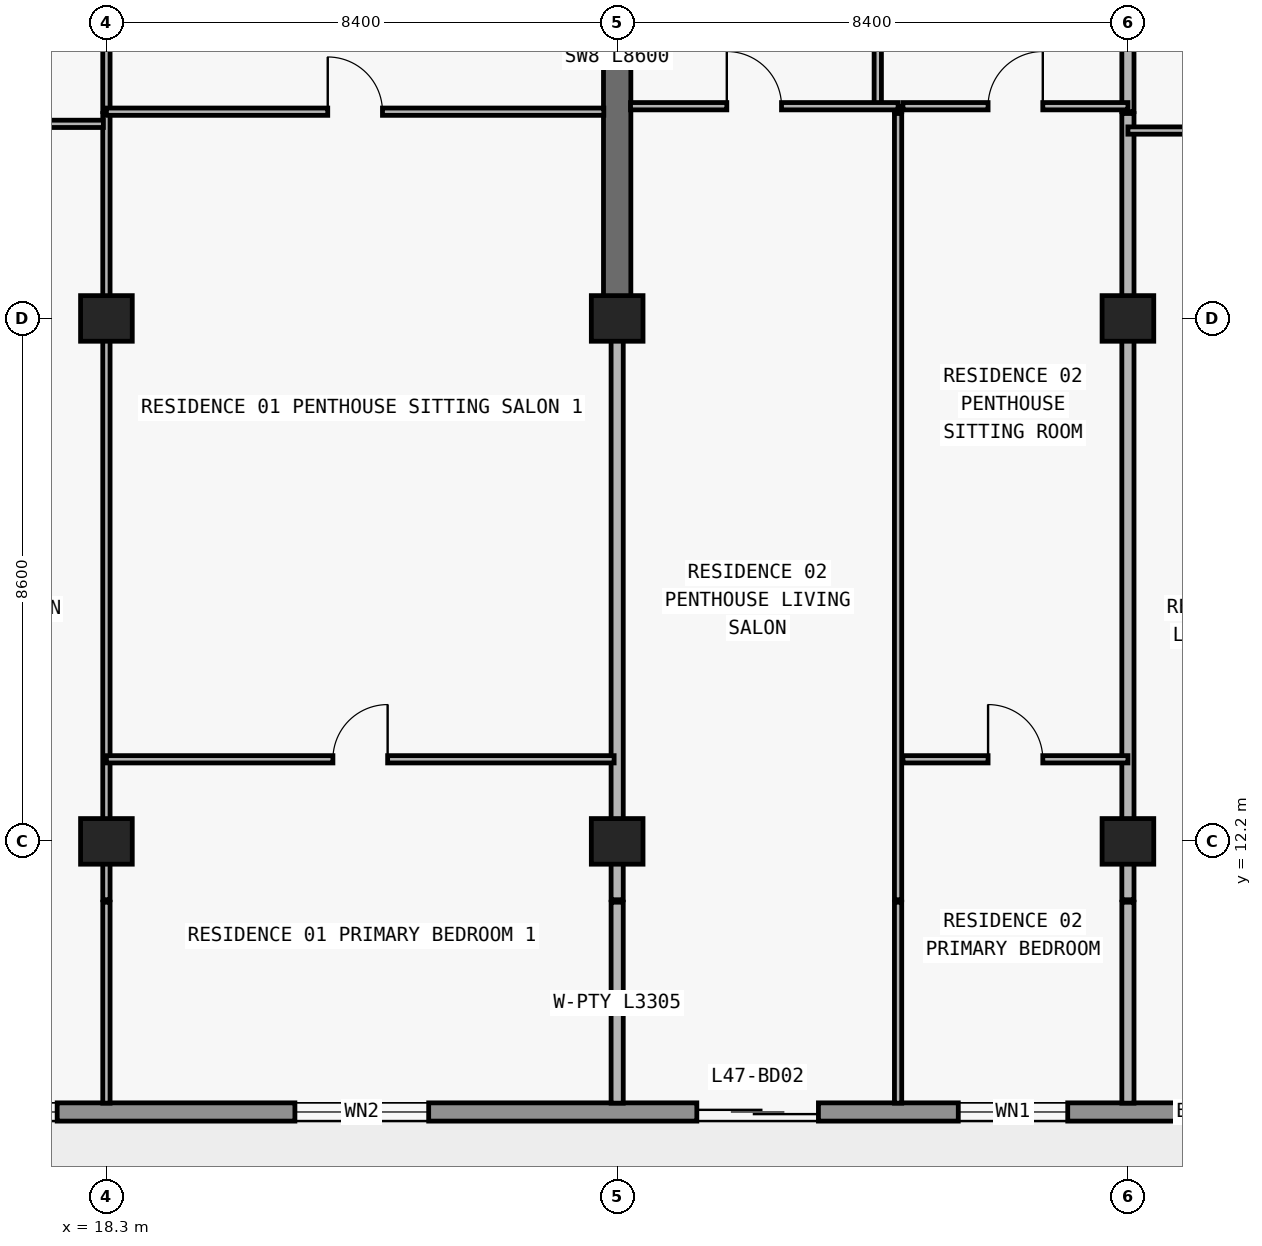
"""IFC4 building model, lengths in metres.
Left out: names, types, materials, properties, quantities, classifications, styles, units other than length and angle.
Written with IfcOpenShell. Run it as: python <this file> out.ifc"""

import sys

from ifc_helpers import new_model, si_unit, direction, frame, frame_2d, origin, origin_2d, place, context, subcontext, project, spatial, rectangle, extrude, element, fill, save


model = new_model("IFC4")
c1 = context("Model", 3, precision=1e-05, world=origin(), true_north=direction((0.0, 1.0)))
c2 = subcontext(c1, "Body", "Model", "MODEL_VIEW")
j1 = project(units=[si_unit("LENGTHUNIT", "METRE"), si_unit("PLANEANGLEUNIT", "RADIAN")], contexts=[c1])
p1 = place(None, origin())
s1 = spatial("IfcSite", under=j1, at=p1, CompositionType="ELEMENT")
p2 = place(p1, origin())
s2 = spatial("IfcBuilding", under=s1, at=p2, CompositionType="ELEMENT")
p3 = place(p2, frame((0.0, 0.0, 170.4)))
s3 = spatial("IfcBuildingStorey", under=s2, at=p3, CompositionType="ELEMENT", Elevation=170.4)
for number, where, z_axis, x_axis in (
    (1, (18.3, 12.2, 0.0), (0.0, 0.0, 1.0), (1.0, 0.0, 0.0)),
    (2, (26.7, 12.2, 0.0), (0.0, 0.0, 1.0), (1.0, 0.0, 0.0)),
    (3, (35.1, 12.2, 0.0), (0.0, 0.0, 1.0), (1.0, 0.0, 0.0)),
    (4, (18.3, 20.8, 0.0), (0.0, 0.0, 1.0), (1.0, 0.0, 0.0)),
    (5, (26.7, 20.8, 0.0), (0.0, 0.0, 1.0), (1.0, 0.0, 0.0)),
    (6, (35.1, 20.8, 0.0), (0.0, 0.0, 1.0), (1.0, 0.0, 0.0)),
):
    element("IfcColumn", number, at=place(p3, frame(where, z_axis=z_axis, x_axis=x_axis)), inside=s3, PredefinedType="COLUMN", context=c2, shape_type="SweptSolid", body=[
        extrude(rectangle(XDim=0.85, YDim=0.75, at=origin_2d()), origin(), (0.0, 0.0, 1.0), 3.05),
    ])
p4 = place(p3, frame((26.7, 20.8, 0.0), z_axis=(0.0, 0.0, 1.0), x_axis=(0.0, 1.0, 0.0)))
e7 = element("IfcWall", 7, at=p4, inside=s3, PredefinedType="SHEAR", context=c2, shape_type="SweptSolid", body=[
    extrude(rectangle(XDim=8.6, YDim=0.45, at=frame_2d((4.3, 0.0))), origin(), (0.0, 0.0, 1.0), 3.05),
])
p5 = place(p3, frame((67.7, 7.75, 0.0), z_axis=(0.0, 0.0, 1.0), x_axis=(-1.0, 0.0, 0.0)))
e8 = element("IfcWall", 8, at=p5, inside=s3, PredefinedType="STANDARD", context=c2, shape_type="SweptSolid", body=[
    extrude(rectangle(XDim=57.6, YDim=0.3, at=frame_2d((28.8, 0.0))), origin(), (0.0, 0.0, 1.0), 3.05),
])
p6 = place(p5, frame((54.69, 0.0, 0.0)))
e9 = element("IfcOpeningElement", 9, at=p6, cuts=e8, PredefinedType="OPENING", context=c2, shape_type="SweptSolid", body=[
    extrude(rectangle(XDim=2.0, YDim=2.3, at=frame_2d((1.0, 1.15))), frame((0.0, 0.16, 0.0), z_axis=(0.0, -1.0, 0.0), x_axis=(1.0, 0.0, 0.0)), (0.0, 0.0, 1.0), 0.32),
])
p7 = place(p5, frame((50.21, 0.0, 0.65)))
e10 = element("IfcOpeningElement", 10, at=p7, cuts=e8, PredefinedType="OPENING", context=c2, shape_type="SweptSolid", body=[
    extrude(rectangle(XDim=2.6, YDim=1.85, at=frame_2d((1.3, 0.925))), frame((0.0, 0.16, 0.0), z_axis=(0.0, -1.0, 0.0), x_axis=(1.0, 0.0, 0.0)), (0.0, 0.0, 1.0), 0.32),
])
p8 = place(p5, frame((44.1, 0.0, 0.85)))
e11 = element("IfcOpeningElement", 11, at=p8, cuts=e8, PredefinedType="OPENING", context=c2, shape_type="SweptSolid", body=[
    extrude(rectangle(XDim=2.2, YDim=1.55, at=frame_2d((1.1, 0.775))), frame((0.0, 0.16, 0.0), z_axis=(0.0, -1.0, 0.0), x_axis=(1.0, 0.0, 0.0)), (0.0, 0.0, 1.0), 0.32),
])
p9 = place(p5, frame((37.69, 0.0, 0.0)))
e12 = element("IfcOpeningElement", 12, at=p9, cuts=e8, PredefinedType="OPENING", context=c2, shape_type="SweptSolid", body=[
    extrude(rectangle(XDim=2.0, YDim=2.3, at=frame_2d((1.0, 1.15))), frame((0.0, 0.16, 0.0), z_axis=(0.0, -1.0, 0.0), x_axis=(1.0, 0.0, 0.0)), (0.0, 0.0, 1.0), 0.32),
])
p10 = place(p5, frame((33.59, 0.0, 0.85)))
e13 = element("IfcOpeningElement", 13, at=p10, cuts=e8, PredefinedType="OPENING", context=c2, shape_type="SweptSolid", body=[
    extrude(rectangle(XDim=1.8, YDim=1.55, at=frame_2d((0.9, 0.775))), frame((0.0, 0.16, 0.0), z_axis=(0.0, -1.0, 0.0), x_axis=(1.0, 0.0, 0.0)), (0.0, 0.0, 1.0), 0.32),
])
p11 = place(p5, frame((25.914, 0.0, 0.85)))
e14 = element("IfcOpeningElement", 14, at=p11, cuts=e8, PredefinedType="OPENING", context=c2, shape_type="SweptSolid", body=[
    extrude(rectangle(XDim=2.2, YDim=1.55, at=frame_2d((1.1, 0.775))), frame((0.0, 0.16, 0.0), z_axis=(0.0, -1.0, 0.0), x_axis=(1.0, 0.0, 0.0)), (0.0, 0.0, 1.0), 0.32),
])
p12 = place(p5, frame((21.69, 0.0, 0.0)))
e15 = element("IfcOpeningElement", 15, at=p12, cuts=e8, PredefinedType="OPENING", context=c2, shape_type="SweptSolid", body=[
    extrude(rectangle(XDim=2.0, YDim=2.3, at=frame_2d((1.0, 1.15))), frame((0.0, 0.16, 0.0), z_axis=(0.0, -1.0, 0.0), x_axis=(1.0, 0.0, 0.0)), (0.0, 0.0, 1.0), 0.32),
])
p13 = place(p5, frame((17.59, 0.0, 0.85)))
e16 = element("IfcOpeningElement", 16, at=p13, cuts=e8, PredefinedType="OPENING", context=c2, shape_type="SweptSolid", body=[
    extrude(rectangle(XDim=1.8, YDim=1.55, at=frame_2d((0.9, 0.775))), frame((0.0, 0.16, 0.0), z_axis=(0.0, -1.0, 0.0), x_axis=(1.0, 0.0, 0.0)), (0.0, 0.0, 1.0), 0.32),
])
p14 = place(p5, frame((13.69, 0.0, 0.0)))
e17 = element("IfcOpeningElement", 17, at=p14, cuts=e8, PredefinedType="OPENING", context=c2, shape_type="SweptSolid", body=[
    extrude(rectangle(XDim=2.0, YDim=2.3, at=frame_2d((1.0, 1.15))), frame((0.0, 0.16, 0.0), z_axis=(0.0, -1.0, 0.0), x_axis=(1.0, 0.0, 0.0)), (0.0, 0.0, 1.0), 0.32),
])
p15 = place(p5, frame((9.01, 0.0, 0.65)))
e18 = element("IfcOpeningElement", 18, at=p15, cuts=e8, PredefinedType="OPENING", context=c2, shape_type="SweptSolid", body=[
    extrude(rectangle(XDim=2.6, YDim=1.85, at=frame_2d((1.3, 0.925))), frame((0.0, 0.16, 0.0), z_axis=(0.0, -1.0, 0.0), x_axis=(1.0, 0.0, 0.0)), (0.0, 0.0, 1.0), 0.32),
])
p16 = place(p5, frame((3.0, 0.0, 0.85)))
e19 = element("IfcOpeningElement", 19, at=p16, cuts=e8, PredefinedType="OPENING", context=c2, shape_type="SweptSolid", body=[
    extrude(rectangle(XDim=2.2, YDim=1.55, at=frame_2d((1.1, 0.775))), frame((0.0, 0.16, 0.0), z_axis=(0.0, -1.0, 0.0), x_axis=(1.0, 0.0, 0.0)), (0.0, 0.0, 1.0), 0.32),
])
p17 = place(p3, frame((18.3, 7.895, 0.0), z_axis=(0.0, 0.0, 1.0), x_axis=(0.0, 1.0, 0.0)))
e20 = element("IfcWall", 20, at=p17, inside=s3, PredefinedType="PARTITIONING", context=c2, shape_type="SweptSolid", body=[
    extrude(rectangle(XDim=3.305, YDim=0.12, at=frame_2d((1.652, 0.0))), origin(), (0.0, 0.0, 1.0), 3.05),
])
p18 = place(p3, frame((18.3, 11.24, 0.0), z_axis=(0.0, 0.0, 1.0), x_axis=(0.0, 1.0, 0.0)))
e21 = element("IfcWall", 21, at=p18, inside=s3, PredefinedType="PARTITIONING", context=c2, shape_type="SweptSolid", body=[
    extrude(rectangle(XDim=12.93, YDim=0.12, at=frame_2d((6.465, 0.0))), origin(), (0.0, 0.0, 1.0), 2.263),
])
p19 = place(p3, frame((18.3, 24.2, 0.0), z_axis=(0.0, 0.0, 1.0), x_axis=(0.0, 1.0, 0.0)))
e22 = element("IfcWall", 22, at=p19, inside=s3, PredefinedType="PARTITIONING", context=c2, shape_type="SweptSolid", body=[
    extrude(rectangle(XDim=4.84, YDim=0.12, at=frame_2d((2.42, 0.0))), origin(), (0.0, 0.0, 1.0), 2.263),
])
p20 = place(p19, frame((1.75, 0.0, 0.0)))
e23 = element("IfcOpeningElement", 23, at=p20, cuts=e22, PredefinedType="OPENING", context=c2, shape_type="SweptSolid", body=[
    extrude(rectangle(XDim=0.9, YDim=2.15, at=frame_2d((0.45, 1.075))), frame((0.0, 0.07, 0.0), z_axis=(0.0, -1.0, 0.0), x_axis=(1.0, 0.0, 0.0)), (0.0, 0.0, 1.0), 0.14),
])
p21 = place(p3, frame((26.7, 7.895, 0.0), z_axis=(0.0, 0.0, 1.0), x_axis=(0.0, 1.0, 0.0)))
e24 = element("IfcWall", 24, at=p21, inside=s3, PredefinedType="PARTITIONING", context=c2, shape_type="SweptSolid", body=[
    extrude(rectangle(XDim=3.305, YDim=0.2, at=frame_2d((1.652, 0.0))), origin(), (0.0, 0.0, 1.0), 3.05),
])
p22 = place(p3, frame((26.7, 11.24, 0.0), z_axis=(0.0, 0.0, 1.0), x_axis=(0.0, 1.0, 0.0)))
e25 = element("IfcWall", 25, at=p22, inside=s3, PredefinedType="PARTITIONING", context=c2, shape_type="SweptSolid", body=[
    extrude(rectangle(XDim=9.555, YDim=0.2, at=frame_2d((4.777, 0.0))), origin(), (0.0, 0.0, 1.0), 2.263),
])
p23 = place(p3, frame((30.986, 24.29, 0.0), z_axis=(0.0, 0.0, 1.0), x_axis=(0.0, 1.0, 0.0)))
e26 = element("IfcWall", 26, at=p23, inside=s3, PredefinedType="PARTITIONING", context=c2, shape_type="SweptSolid", body=[
    extrude(rectangle(XDim=4.75, YDim=0.12, at=frame_2d((2.375, 0.0))), origin(), (0.0, 0.0, 1.0), 2.725),
])
p24 = place(p23, frame((1.925, 0.0, 0.0)))
e27 = element("IfcOpeningElement", 27, at=p24, cuts=e26, PredefinedType="OPENING", context=c2, shape_type="SweptSolid", body=[
    extrude(rectangle(XDim=0.9, YDim=2.15, at=frame_2d((0.45, 1.075))), frame((0.0, 0.07, 0.0), z_axis=(0.0, -1.0, 0.0), x_axis=(1.0, 0.0, 0.0)), (0.0, 0.0, 1.0), 0.14),
])
p25 = place(p3, frame((31.32, 7.895, 0.0), z_axis=(0.0, 0.0, 1.0), x_axis=(0.0, 1.0, 0.0)))
e28 = element("IfcWall", 28, at=p25, inside=s3, PredefinedType="PARTITIONING", context=c2, shape_type="SweptSolid", body=[
    extrude(rectangle(XDim=3.305, YDim=0.12, at=frame_2d((1.652, 0.0))), origin(), (0.0, 0.0, 1.0), 3.05),
])
p26 = place(p3, frame((31.32, 11.24, 0.0), z_axis=(0.0, 0.0, 1.0), x_axis=(0.0, 1.0, 0.0)))
e29 = element("IfcWall", 29, at=p26, inside=s3, PredefinedType="PARTITIONING", context=c2, shape_type="SweptSolid", body=[
    extrude(rectangle(XDim=12.93, YDim=0.12, at=frame_2d((6.465, 0.0))), origin(), (0.0, 0.0, 1.0), 3.05),
])
p27 = place(p3, frame((31.32, 24.2, 0.0), z_axis=(0.0, 0.0, 1.0), x_axis=(0.0, 1.0, 0.0)))
e30 = element("IfcWall", 30, at=p27, inside=s3, PredefinedType="PARTITIONING", context=c2, shape_type="SweptSolid", body=[
    extrude(rectangle(XDim=0.09, YDim=0.12, at=frame_2d((0.045, 0.0))), origin(), (0.0, 0.0, 1.0), 3.05),
])
p28 = place(p3, frame((35.1, 7.895, 0.0), z_axis=(0.0, 0.0, 1.0), x_axis=(0.0, 1.0, 0.0)))
e31 = element("IfcWall", 31, at=p28, inside=s3, PredefinedType="PARTITIONING", context=c2, shape_type="SweptSolid", body=[
    extrude(rectangle(XDim=3.305, YDim=0.2, at=frame_2d((1.652, 0.0))), origin(), (0.0, 0.0, 1.0), 3.05),
])
p29 = place(p3, frame((35.1, 11.24, 0.0), z_axis=(0.0, 0.0, 1.0), x_axis=(0.0, 1.0, 0.0)))
e32 = element("IfcWall", 32, at=p29, inside=s3, PredefinedType="PARTITIONING", context=c2, shape_type="SweptSolid", body=[
    extrude(rectangle(XDim=12.93, YDim=0.2, at=frame_2d((6.465, 0.0))), origin(), (0.0, 0.0, 1.0), 2.263),
])
p30 = place(p3, frame((35.1, 24.2, 0.0), z_axis=(0.0, 0.0, 1.0), x_axis=(0.0, 1.0, 0.0)))
e33 = element("IfcWall", 33, at=p30, inside=s3, PredefinedType="PARTITIONING", context=c2, shape_type="SweptSolid", body=[
    extrude(rectangle(XDim=4.84, YDim=0.2, at=frame_2d((2.42, 0.0))), origin(), (0.0, 0.0, 1.0), 2.263),
])
p31 = place(p3, frame((18.3, 13.55, 0.0), z_axis=(0.0, 0.0, 1.0), x_axis=(1.0, 0.0, 0.0)))
e34 = element("IfcWall", 34, at=p31, inside=s3, PredefinedType="PARTITIONING", context=c2, shape_type="SweptSolid", body=[
    extrude(rectangle(XDim=8.35, YDim=0.12, at=frame_2d((4.175, 0.0))), origin(), (0.0, 0.0, 1.0), 3.05),
])
p32 = place(p31, frame((3.725, 0.0, 0.0)))
e35 = element("IfcOpeningElement", 35, at=p32, cuts=e34, PredefinedType="OPENING", context=c2, shape_type="SweptSolid", body=[
    extrude(rectangle(XDim=0.9, YDim=2.15, at=frame_2d((0.45, 1.075))), frame((0.0, 0.07, 0.0), z_axis=(0.0, -1.0, 0.0), x_axis=(1.0, 0.0, 0.0)), (0.0, 0.0, 1.0), 0.14),
])
p33 = place(p3, frame((31.4, 13.55, 0.0), z_axis=(0.0, 0.0, 1.0), x_axis=(1.0, 0.0, 0.0)))
e36 = element("IfcWall", 36, at=p33, inside=s3, PredefinedType="PARTITIONING", context=c2, shape_type="SweptSolid", body=[
    extrude(rectangle(XDim=3.7, YDim=0.12, at=frame_2d((1.85, 0.0))), origin(), (0.0, 0.0, 1.0), 3.05),
])
p34 = place(p33, frame((1.4, 0.0, 0.0)))
e37 = element("IfcOpeningElement", 37, at=p34, cuts=e36, PredefinedType="OPENING", context=c2, shape_type="SweptSolid", body=[
    extrude(rectangle(XDim=0.9, YDim=2.15, at=frame_2d((0.45, 1.075))), frame((0.0, 0.07, 0.0), z_axis=(0.0, -1.0, 0.0), x_axis=(1.0, 0.0, 0.0)), (0.0, 0.0, 1.0), 0.14),
])
p35 = place(p3, frame((35.1, 23.89, 0.0), z_axis=(0.0, 0.0, 1.0), x_axis=(1.0, 0.0, 0.0)))
e38 = element("IfcWall", 38, at=p35, inside=s3, PredefinedType="PARTITIONING", context=c2, shape_type="SweptSolid", body=[
    extrude(rectangle(XDim=7.6, YDim=0.12, at=frame_2d((3.8, 0.0))), origin(), (0.0, 0.0, 1.0), 3.05),
])
p36 = place(p35, frame((1.336, 0.0, 0.0)))
e39 = element("IfcOpeningElement", 39, at=p36, cuts=e38, PredefinedType="OPENING", context=c2, shape_type="SweptSolid", body=[
    extrude(rectangle(XDim=0.9, YDim=2.15, at=frame_2d((0.45, 1.075))), frame((0.0, 0.07, 0.0), z_axis=(0.0, -1.0, 0.0), x_axis=(1.0, 0.0, 0.0)), (0.0, 0.0, 1.0), 0.14),
])
p37 = place(p35, frame((5.402, 0.0, 0.0)))
e40 = element("IfcOpeningElement", 40, at=p37, cuts=e38, PredefinedType="OPENING", context=c2, shape_type="SweptSolid", body=[
    extrude(rectangle(XDim=0.9, YDim=2.15, at=frame_2d((0.45, 1.075))), frame((0.0, 0.07, 0.0), z_axis=(0.0, -1.0, 0.0), x_axis=(1.0, 0.0, 0.0)), (0.0, 0.0, 1.0), 0.14),
])
p38 = place(p3, frame((10.1, 24.0, 0.0), z_axis=(0.0, 0.0, 1.0), x_axis=(1.0, 0.0, 0.0)))
e41 = element("IfcWall", 41, at=p38, inside=s3, PredefinedType="PARTITIONING", context=c2, shape_type="SweptSolid", body=[
    extrude(rectangle(XDim=8.15, YDim=0.12, at=frame_2d((4.075, 0.0))), origin(), (0.0, 0.0, 1.0), 3.05),
])
p39 = place(p38, frame((3.625, 0.0, 0.0)))
e42 = element("IfcOpeningElement", 42, at=p39, cuts=e41, PredefinedType="OPENING", context=c2, shape_type="SweptSolid", body=[
    extrude(rectangle(XDim=0.9, YDim=2.15, at=frame_2d((0.45, 1.075))), frame((0.0, 0.07, 0.0), z_axis=(0.0, -1.0, 0.0), x_axis=(1.0, 0.0, 0.0)), (0.0, 0.0, 1.0), 0.14),
])
p40 = place(p3, frame((18.3, 24.2, 0.0), z_axis=(0.0, 0.0, 1.0), x_axis=(1.0, 0.0, 0.0)))
e43 = element("IfcWall", 43, at=p40, inside=s3, PredefinedType="PARTITIONING", context=c2, shape_type="SweptSolid", body=[
    extrude(rectangle(XDim=8.18, YDim=0.12, at=frame_2d((4.09, 0.0))), origin(), (0.0, 0.0, 1.0), 3.05),
])
p41 = place(p40, frame((3.64, 0.0, 0.0)))
e44 = element("IfcOpeningElement", 44, at=p41, cuts=e43, PredefinedType="OPENING", context=c2, shape_type="SweptSolid", body=[
    extrude(rectangle(XDim=0.9, YDim=2.15, at=frame_2d((0.45, 1.075))), frame((0.0, 0.07, 0.0), z_axis=(0.0, -1.0, 0.0), x_axis=(1.0, 0.0, 0.0)), (0.0, 0.0, 1.0), 0.14),
])
p42 = place(p3, frame((26.92, 24.29, 0.0), z_axis=(0.0, 0.0, 1.0), x_axis=(1.0, 0.0, 0.0)))
e45 = element("IfcWall", 45, at=p42, inside=s3, PredefinedType="PARTITIONING", context=c2, shape_type="SweptSolid", body=[
    extrude(rectangle(XDim=4.4, YDim=0.12, at=frame_2d((2.2, 0.0))), origin(), (0.0, 0.0, 1.0), 3.05),
])
p43 = place(p42, frame((1.583, 0.0, 0.0)))
e46 = element("IfcOpeningElement", 46, at=p43, cuts=e45, PredefinedType="OPENING", context=c2, shape_type="SweptSolid", body=[
    extrude(rectangle(XDim=0.9, YDim=2.15, at=frame_2d((0.45, 1.075))), frame((0.0, 0.07, 0.0), z_axis=(0.0, -1.0, 0.0), x_axis=(1.0, 0.0, 0.0)), (0.0, 0.0, 1.0), 0.14),
])
p44 = place(p3, frame((31.4, 24.29, 0.0), z_axis=(0.0, 0.0, 1.0), x_axis=(1.0, 0.0, 0.0)))
e47 = element("IfcWall", 47, at=p44, inside=s3, PredefinedType="PARTITIONING", context=c2, shape_type="SweptSolid", body=[
    extrude(rectangle(XDim=3.7, YDim=0.12, at=frame_2d((1.85, 0.0))), origin(), (0.0, 0.0, 1.0), 3.05),
])
p45 = place(p44, frame((1.4, 0.0, 0.0)))
e48 = element("IfcOpeningElement", 48, at=p45, cuts=e47, PredefinedType="OPENING", context=c2, shape_type="SweptSolid", body=[
    extrude(rectangle(XDim=0.9, YDim=2.15, at=frame_2d((0.45, 1.075))), frame((0.0, 0.07, 0.0), z_axis=(0.0, -1.0, 0.0), x_axis=(1.0, 0.0, 0.0)), (0.0, 0.0, 1.0), 0.14),
])
p46 = place(p7, origin())
e49 = element("IfcWindow", 49, at=p46, inside=s3, PartitioningType="SINGLE_PANEL", PredefinedType="WINDOW", context=c2, shape_type="SweptSolid", body=[
    extrude(rectangle(XDim=2.6, YDim=1.85, at=frame_2d((1.3, 0.925))), frame((0.0, 0.03, 0.0), z_axis=(0.0, -1.0, 0.0), x_axis=(1.0, 0.0, 0.0)), (0.0, 0.0, 1.0), 0.06),
])
fill(e10, e49)
p47 = place(p8, origin())
e50 = element("IfcWindow", 50, at=p47, inside=s3, PartitioningType="SINGLE_PANEL", PredefinedType="WINDOW", context=c2, shape_type="SweptSolid", body=[
    extrude(rectangle(XDim=2.2, YDim=1.55, at=frame_2d((1.1, 0.775))), frame((0.0, 0.03, 0.0), z_axis=(0.0, -1.0, 0.0), x_axis=(1.0, 0.0, 0.0)), (0.0, 0.0, 1.0), 0.06),
])
fill(e11, e50)
p48 = place(p9, origin())
e51 = element("IfcDoor", 51, at=p48, inside=s3, OperationType="DOUBLE_DOOR_SLIDING", PredefinedType="DOOR", context=c2, shape_type="SweptSolid", body=[
    extrude(rectangle(XDim=2.0, YDim=2.3, at=frame_2d((1.0, 1.15))), frame((0.0, 0.025, 0.0), z_axis=(0.0, -1.0, 0.0), x_axis=(1.0, 0.0, 0.0)), (0.0, 0.0, 1.0), 0.05),
])
fill(e12, e51)
p49 = place(p10, origin())
e52 = element("IfcWindow", 52, at=p49, inside=s3, PartitioningType="SINGLE_PANEL", PredefinedType="WINDOW", context=c2, shape_type="SweptSolid", body=[
    extrude(rectangle(XDim=1.8, YDim=1.55, at=frame_2d((0.9, 0.775))), frame((0.0, 0.03, 0.0), z_axis=(0.0, -1.0, 0.0), x_axis=(1.0, 0.0, 0.0)), (0.0, 0.0, 1.0), 0.06),
])
fill(e13, e52)
p50 = place(p41, origin())
e53 = element("IfcDoor", 53, at=p50, inside=s3, OperationType="SINGLE_SWING_LEFT", PredefinedType="DOOR", context=c2, shape_type="SweptSolid", body=[
    extrude(rectangle(XDim=0.9, YDim=2.15, at=frame_2d((0.45, 1.075))), frame((0.0, 0.025, 0.0), z_axis=(0.0, -1.0, 0.0), x_axis=(1.0, 0.0, 0.0)), (0.0, 0.0, 1.0), 0.05),
])
fill(e44, e53)
p51 = place(p32, origin())
e54 = element("IfcDoor", 54, at=p51, inside=s3, OperationType="SINGLE_SWING_RIGHT", PredefinedType="DOOR", context=c2, shape_type="SweptSolid", body=[
    extrude(rectangle(XDim=0.9, YDim=2.15, at=frame_2d((0.45, 1.075))), frame((0.0, 0.025, 0.0), z_axis=(0.0, -1.0, 0.0), x_axis=(1.0, 0.0, 0.0)), (0.0, 0.0, 1.0), 0.05),
])
fill(e35, e54)
p52 = place(p43, origin())
e55 = element("IfcDoor", 55, at=p52, inside=s3, OperationType="SINGLE_SWING_LEFT", PredefinedType="DOOR", context=c2, shape_type="SweptSolid", body=[
    extrude(rectangle(XDim=0.9, YDim=2.15, at=frame_2d((0.45, 1.075))), frame((0.0, 0.025, 0.0), z_axis=(0.0, -1.0, 0.0), x_axis=(1.0, 0.0, 0.0)), (0.0, 0.0, 1.0), 0.05),
])
fill(e46, e55)
p53 = place(p45, origin())
e56 = element("IfcDoor", 56, at=p53, inside=s3, OperationType="SINGLE_SWING_RIGHT", PredefinedType="DOOR", context=c2, shape_type="SweptSolid", body=[
    extrude(rectangle(XDim=0.9, YDim=2.15, at=frame_2d((0.45, 1.075))), frame((0.0, 0.025, 0.0), z_axis=(0.0, -1.0, 0.0), x_axis=(1.0, 0.0, 0.0)), (0.0, 0.0, 1.0), 0.05),
])
fill(e48, e56)
p54 = place(p34, origin())
e57 = element("IfcDoor", 57, at=p54, inside=s3, OperationType="SINGLE_SWING_LEFT", PredefinedType="DOOR", context=c2, shape_type="SweptSolid", body=[
    extrude(rectangle(XDim=0.9, YDim=2.15, at=frame_2d((0.45, 1.075))), frame((0.0, 0.025, 0.0), z_axis=(0.0, -1.0, 0.0), x_axis=(1.0, 0.0, 0.0)), (0.0, 0.0, 1.0), 0.05),
])
fill(e37, e57)
save(model, sys.argv[1])
